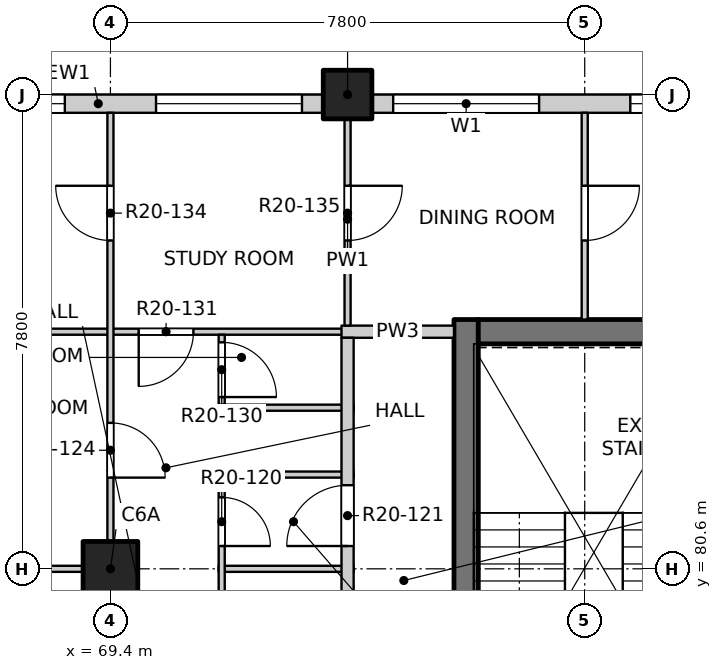
"""IFC4 building model, lengths in metres.
Left out: names, types, materials, properties, quantities, classifications, styles, units other than length and angle.
Written with IfcOpenShell. Run it as: python <this file> out.ifc"""

import sys

from ifc_helpers import new_model, si_unit, direction, frame, frame_2d, origin, origin_2d, place, context, subcontext, project, spatial, rectangle, extrude, element, fill, save


model = new_model("IFC4")
c1 = context("Model", 3, precision=1e-05, world=origin(), true_north=direction((0.0, 1.0)))
c2 = subcontext(c1, "Body", "Model", "MODEL_VIEW")
j1 = project(units=[si_unit("LENGTHUNIT", "METRE"), si_unit("PLANEANGLEUNIT", "RADIAN")], contexts=[c1])
p1 = place(None, origin())
s1 = spatial("IfcSite", under=j1, at=p1, CompositionType="ELEMENT")
p2 = place(p1, origin())
s2 = spatial("IfcBuilding", under=s1, at=p2, CompositionType="ELEMENT")
p3 = place(p2, frame((0.0, 0.0, 210.9)))
s3 = spatial("IfcBuildingStorey", under=s2, at=p3, CompositionType="ELEMENT", Elevation=210.9)
p4 = place(p3, frame((73.3, 88.4, -0.25), z_axis=(0.0, 0.0, 1.0), x_axis=(1.0, 0.0, 0.0)))
e1 = element("IfcColumn", 1, at=p4, inside=s3, PredefinedType="COLUMN", context=c2, shape_type="SweptSolid", body=[
    extrude(rectangle(XDim=0.8, YDim=0.8, at=origin_2d()), origin(), (0.0, 0.0, 1.0), 3.4),
])
p5 = place(p3, frame((69.4, 80.6, -0.25), z_axis=(0.0, 0.0, 1.0), x_axis=(1.0, 0.0, 0.0)))
e2 = element("IfcColumn", 2, at=p5, inside=s3, PredefinedType="COLUMN", context=c2, shape_type="SweptSolid", body=[
    extrude(rectangle(XDim=0.9, YDim=0.9, at=origin_2d()), origin(), (0.0, 0.0, 1.0), 3.4),
])
p6 = place(p3, frame((75.25, 77.3, -0.25), z_axis=(0.0, 0.0, 1.0), x_axis=(0.0, 1.0, 0.0)))
e3 = element("IfcWall", 3, at=p6, inside=s3, PredefinedType="SOLIDWALL", context=c2, shape_type="SweptSolid", body=[
    extrude(rectangle(XDim=7.4, YDim=0.4, at=frame_2d((3.7, 0.0))), origin(), (0.0, 0.0, 1.0), 3.4),
])
p7 = place(p6, frame((0.3, 0.0, 0.25)))
e4 = element("IfcOpeningElement", 4, at=p7, cuts=e3, PredefinedType="OPENING", context=c2, shape_type="SweptSolid", body=[
    extrude(rectangle(XDim=1.2, YDim=2.1, at=frame_2d((0.6, 1.05))), frame((0.0, 0.21, 0.0), z_axis=(0.0, -1.0, 0.0), x_axis=(1.0, 0.0, 0.0)), (0.0, 0.0, 1.0), 0.42),
])
p8 = place(p3, frame((75.45, 84.5, -0.25), z_axis=(0.0, 0.0, 1.0), x_axis=(1.0, 0.0, 0.0)))
e5 = element("IfcWall", 5, at=p8, inside=s3, PredefinedType="SOLIDWALL", context=c2, shape_type="SweptSolid", body=[
    extrude(rectangle(XDim=19.1, YDim=0.4, at=frame_2d((9.55, 0.0))), origin(), (0.0, 0.0, 1.0), 3.4),
])
p9 = place(p3, frame((65.5, 88.25, 0.0), z_axis=(0.0, 0.0, 1.0), x_axis=(1.0, 0.0, 0.0)))
e6 = element("IfcWall", 6, at=p9, inside=s3, PredefinedType="SOLIDWALL", context=c2, shape_type="SweptSolid", body=[
    extrude(rectangle(XDim=7.4, YDim=0.3, at=frame_2d((3.7, 0.0))), origin(), (0.0, 0.0, 1.0), 2.7),
])
p10 = place(p9, frame((0.75, 0.0, 0.9)))
e7 = element("IfcOpeningElement", 7, at=p10, cuts=e6, PredefinedType="OPENING", context=c2, shape_type="SweptSolid", body=[
    extrude(rectangle(XDim=2.4, YDim=1.8, at=frame_2d((1.2, 0.9))), frame((0.0, 0.16, 0.0), z_axis=(0.0, -1.0, 0.0), x_axis=(1.0, 0.0, 0.0)), (0.0, 0.0, 1.0), 0.32),
])
p11 = place(p9, frame((4.65, 0.0, 0.9)))
e8 = element("IfcOpeningElement", 8, at=p11, cuts=e6, PredefinedType="OPENING", context=c2, shape_type="SweptSolid", body=[
    extrude(rectangle(XDim=2.4, YDim=1.8, at=frame_2d((1.2, 0.9))), frame((0.0, 0.16, 0.0), z_axis=(0.0, -1.0, 0.0), x_axis=(1.0, 0.0, 0.0)), (0.0, 0.0, 1.0), 0.32),
])
p12 = place(p3, frame((73.7, 88.25, 0.0), z_axis=(0.0, 0.0, 1.0), x_axis=(1.0, 0.0, 0.0)))
e9 = element("IfcWall", 9, at=p12, inside=s3, PredefinedType="SOLIDWALL", context=c2, shape_type="SweptSolid", body=[
    extrude(rectangle(XDim=22.6, YDim=0.3, at=frame_2d((11.3, 0.0))), origin(), (0.0, 0.0, 1.0), 2.7),
])
p13 = place(p12, frame((0.35, 0.0, 0.9)))
e10 = element("IfcOpeningElement", 10, at=p13, cuts=e9, PredefinedType="OPENING", context=c2, shape_type="SweptSolid", body=[
    extrude(rectangle(XDim=2.4, YDim=1.8, at=frame_2d((1.2, 0.9))), frame((0.0, 0.16, 0.0), z_axis=(0.0, -1.0, 0.0), x_axis=(1.0, 0.0, 0.0)), (0.0, 0.0, 1.0), 0.32),
])
p14 = place(p12, frame((4.25, 0.0, 0.9)))
e11 = element("IfcOpeningElement", 11, at=p14, cuts=e9, PredefinedType="OPENING", context=c2, shape_type="SweptSolid", body=[
    extrude(rectangle(XDim=2.4, YDim=1.8, at=frame_2d((1.2, 0.9))), frame((0.0, 0.16, 0.0), z_axis=(0.0, -1.0, 0.0), x_axis=(1.0, 0.0, 0.0)), (0.0, 0.0, 1.0), 0.32),
])
p15 = place(p12, frame((8.15, 0.0, 0.9)))
e12 = element("IfcOpeningElement", 12, at=p15, cuts=e9, PredefinedType="OPENING", context=c2, shape_type="SweptSolid", body=[
    extrude(rectangle(XDim=2.4, YDim=1.8, at=frame_2d((1.2, 0.9))), frame((0.0, 0.16, 0.0), z_axis=(0.0, -1.0, 0.0), x_axis=(1.0, 0.0, 0.0)), (0.0, 0.0, 1.0), 0.32),
])
p16 = place(p12, frame((12.05, 0.0, 0.9)))
e13 = element("IfcOpeningElement", 13, at=p16, cuts=e9, PredefinedType="OPENING", context=c2, shape_type="SweptSolid", body=[
    extrude(rectangle(XDim=2.4, YDim=1.8, at=frame_2d((1.2, 0.9))), frame((0.0, 0.16, 0.0), z_axis=(0.0, -1.0, 0.0), x_axis=(1.0, 0.0, 0.0)), (0.0, 0.0, 1.0), 0.32),
])
p17 = place(p12, frame((15.95, 0.0, 0.9)))
e14 = element("IfcOpeningElement", 14, at=p17, cuts=e9, PredefinedType="OPENING", context=c2, shape_type="SweptSolid", body=[
    extrude(rectangle(XDim=2.4, YDim=1.8, at=frame_2d((1.2, 0.9))), frame((0.0, 0.16, 0.0), z_axis=(0.0, -1.0, 0.0), x_axis=(1.0, 0.0, 0.0)), (0.0, 0.0, 1.0), 0.32),
])
p18 = place(p12, frame((19.85, 0.0, 0.9)))
e15 = element("IfcOpeningElement", 15, at=p18, cuts=e9, PredefinedType="OPENING", context=c2, shape_type="SweptSolid", body=[
    extrude(rectangle(XDim=2.4, YDim=1.8, at=frame_2d((1.2, 0.9))), frame((0.0, 0.16, 0.0), z_axis=(0.0, -1.0, 0.0), x_axis=(1.0, 0.0, 0.0)), (0.0, 0.0, 1.0), 0.32),
])
p19 = place(p3, frame((61.9, 80.6, 0.0), z_axis=(0.0, 0.0, 1.0), x_axis=(1.0, 0.0, 0.0)))
e16 = element("IfcWall", 16, at=p19, inside=s3, PredefinedType="PARTITIONING", context=c2, shape_type="SweptSolid", body=[
    extrude(rectangle(XDim=7.55, YDim=0.1, at=frame_2d((3.775, 0.0))), origin(), (0.0, 0.0, 1.0), 3.15),
])
for number, where, z_axis, x_axis in (
    (17, (71.18, 80.6, 0.0), (0.0, 0.0, 1.0), (1.0, 0.0, 0.0)),
    (18, (71.18, 82.15, 0.0), (0.0, 0.0, 1.0), (1.0, 0.0, 0.0)),
    (19, (71.18, 83.25, 0.0), (0.0, 0.0, 1.0), (1.0, 0.0, 0.0)),
):
    element("IfcWall", number, at=place(p3, frame(where, z_axis=z_axis, x_axis=x_axis)), inside=s3, PredefinedType="PARTITIONING", context=c2, shape_type="SweptSolid", body=[
        extrude(rectangle(XDim=2.22, YDim=0.1, at=frame_2d((1.11, 0.0))), origin(), (0.0, 0.0, 1.0), 3.15),
    ])
p20 = place(p3, frame((61.9, 84.5, 0.0), z_axis=(0.0, 0.0, 1.0), x_axis=(1.0, 0.0, 0.0)))
e20 = element("IfcWall", 20, at=p20, inside=s3, PredefinedType="PARTITIONING", context=c2, shape_type="SweptSolid", body=[
    extrude(rectangle(XDim=11.5, YDim=0.1, at=frame_2d((5.75, 0.0))), origin(), (0.0, 0.0, 1.0), 3.15),
])
p21 = place(p20, frame((7.965, 0.0, 0.0)))
e21 = element("IfcOpeningElement", 21, at=p21, cuts=e20, PredefinedType="OPENING", context=c2, shape_type="SweptSolid", body=[
    extrude(rectangle(XDim=0.9, YDim=2.1, at=frame_2d((0.45, 1.05))), frame((0.0, 0.06, 0.0), z_axis=(0.0, -1.0, 0.0), x_axis=(1.0, 0.0, 0.0)), (0.0, 0.0, 1.0), 0.12),
])
p22 = place(p3, frame((73.2, 84.5, 0.0), z_axis=(0.0, 0.0, 1.0), x_axis=(1.0, 0.0, 0.0)))
e22 = element("IfcWall", 22, at=p22, inside=s3, PredefinedType="PARTITIONING", context=c2, shape_type="SweptSolid", body=[
    extrude(rectangle(XDim=1.85, YDim=0.2, at=frame_2d((0.925, 0.0))), origin(), (0.0, 0.0, 1.0), 3.15),
])
p23 = place(p3, frame((69.4, 41.9, 0.0), z_axis=(0.0, 0.0, 1.0), x_axis=(0.0, 1.0, 0.0)))
e23 = element("IfcWall", 23, at=p23, inside=s3, PredefinedType="PARTITIONING", context=c2, shape_type="SweptSolid", body=[
    extrude(rectangle(XDim=46.2, YDim=0.1, at=frame_2d((23.1, 0.0))), origin(), (0.0, 0.0, 1.0), 3.15),
])
p24 = place(p23, frame((1.2, 0.0, 0.0)))
e24 = element("IfcOpeningElement", 24, at=p24, cuts=e23, PredefinedType="OPENING", context=c2, shape_type="SweptSolid", body=[
    extrude(rectangle(XDim=0.9, YDim=2.1, at=frame_2d((0.45, 1.05))), frame((0.0, 0.06, 0.0), z_axis=(0.0, -1.0, 0.0), x_axis=(1.0, 0.0, 0.0)), (0.0, 0.0, 1.0), 0.12),
])
p25 = place(p23, frame((5.1, 0.0, 0.0)))
e25 = element("IfcOpeningElement", 25, at=p25, cuts=e23, PredefinedType="OPENING", context=c2, shape_type="SweptSolid", body=[
    extrude(rectangle(XDim=0.9, YDim=2.1, at=frame_2d((0.45, 1.05))), frame((0.0, 0.06, 0.0), z_axis=(0.0, -1.0, 0.0), x_axis=(1.0, 0.0, 0.0)), (0.0, 0.0, 1.0), 0.12),
])
p26 = place(p23, frame((9.975, 0.0, 0.0)))
e26 = element("IfcOpeningElement", 26, at=p26, cuts=e23, PredefinedType="OPENING", context=c2, shape_type="SweptSolid", body=[
    extrude(rectangle(XDim=0.9, YDim=2.1, at=frame_2d((0.45, 1.05))), frame((0.0, 0.06, 0.0), z_axis=(0.0, -1.0, 0.0), x_axis=(1.0, 0.0, 0.0)), (0.0, 0.0, 1.0), 0.12),
])
p27 = place(p23, frame((12.9, 0.0, 0.0)))
e27 = element("IfcOpeningElement", 27, at=p27, cuts=e23, PredefinedType="OPENING", context=c2, shape_type="SweptSolid", body=[
    extrude(rectangle(XDim=0.9, YDim=2.1, at=frame_2d((0.45, 1.05))), frame((0.0, 0.06, 0.0), z_axis=(0.0, -1.0, 0.0), x_axis=(1.0, 0.0, 0.0)), (0.0, 0.0, 1.0), 0.12),
])
p28 = place(p23, frame((17.775, 0.0, 0.0)))
e28 = element("IfcOpeningElement", 28, at=p28, cuts=e23, PredefinedType="OPENING", context=c2, shape_type="SweptSolid", body=[
    extrude(rectangle(XDim=0.9, YDim=2.1, at=frame_2d((0.45, 1.05))), frame((0.0, 0.06, 0.0), z_axis=(0.0, -1.0, 0.0), x_axis=(1.0, 0.0, 0.0)), (0.0, 0.0, 1.0), 0.12),
])
p29 = place(p23, frame((21.625, 0.0, 0.0)))
e29 = element("IfcOpeningElement", 29, at=p29, cuts=e23, PredefinedType="OPENING", context=c2, shape_type="SweptSolid", body=[
    extrude(rectangle(XDim=0.9, YDim=2.1, at=frame_2d((0.45, 1.05))), frame((0.0, 0.06, 0.0), z_axis=(0.0, -1.0, 0.0), x_axis=(1.0, 0.0, 0.0)), (0.0, 0.0, 1.0), 0.12),
])
p30 = place(p23, frame((24.6, 0.0, 0.0)))
e30 = element("IfcOpeningElement", 30, at=p30, cuts=e23, PredefinedType="OPENING", context=c2, shape_type="SweptSolid", body=[
    extrude(rectangle(XDim=0.9, YDim=2.1, at=frame_2d((0.45, 1.05))), frame((0.0, 0.06, 0.0), z_axis=(0.0, -1.0, 0.0), x_axis=(1.0, 0.0, 0.0)), (0.0, 0.0, 1.0), 0.12),
])
p31 = place(p23, frame((28.5, 0.0, 0.0)))
e31 = element("IfcOpeningElement", 31, at=p31, cuts=e23, PredefinedType="OPENING", context=c2, shape_type="SweptSolid", body=[
    extrude(rectangle(XDim=0.9, YDim=2.1, at=frame_2d((0.45, 1.05))), frame((0.0, 0.06, 0.0), z_axis=(0.0, -1.0, 0.0), x_axis=(1.0, 0.0, 0.0)), (0.0, 0.0, 1.0), 0.12),
])
p32 = place(p23, frame((33.375, 0.0, 0.0)))
e32 = element("IfcOpeningElement", 32, at=p32, cuts=e23, PredefinedType="OPENING", context=c2, shape_type="SweptSolid", body=[
    extrude(rectangle(XDim=0.9, YDim=2.1, at=frame_2d((0.45, 1.05))), frame((0.0, 0.06, 0.0), z_axis=(0.0, -1.0, 0.0), x_axis=(1.0, 0.0, 0.0)), (0.0, 0.0, 1.0), 0.12),
])
p33 = place(p23, frame((37.225, 0.0, 0.0)))
e33 = element("IfcOpeningElement", 33, at=p33, cuts=e23, PredefinedType="OPENING", context=c2, shape_type="SweptSolid", body=[
    extrude(rectangle(XDim=0.9, YDim=2.1, at=frame_2d((0.45, 1.05))), frame((0.0, 0.06, 0.0), z_axis=(0.0, -1.0, 0.0), x_axis=(1.0, 0.0, 0.0)), (0.0, 0.0, 1.0), 0.12),
])
p34 = place(p23, frame((40.2, 0.0, 0.0)))
e34 = element("IfcOpeningElement", 34, at=p34, cuts=e23, PredefinedType="OPENING", context=c2, shape_type="SweptSolid", body=[
    extrude(rectangle(XDim=0.9, YDim=2.1, at=frame_2d((0.45, 1.05))), frame((0.0, 0.06, 0.0), z_axis=(0.0, -1.0, 0.0), x_axis=(1.0, 0.0, 0.0)), (0.0, 0.0, 1.0), 0.12),
])
p35 = place(p23, frame((44.1, 0.0, 0.0)))
e35 = element("IfcOpeningElement", 35, at=p35, cuts=e23, PredefinedType="OPENING", context=c2, shape_type="SweptSolid", body=[
    extrude(rectangle(XDim=0.9, YDim=2.1, at=frame_2d((0.45, 1.05))), frame((0.0, 0.06, 0.0), z_axis=(0.0, -1.0, 0.0), x_axis=(1.0, 0.0, 0.0)), (0.0, 0.0, 1.0), 0.12),
])
p36 = place(p3, frame((71.23, 74.5, 0.0), z_axis=(0.0, 0.0, 1.0), x_axis=(0.0, 1.0, 0.0)))
e36 = element("IfcWall", 36, at=p36, inside=s3, PredefinedType="PARTITIONING", context=c2, shape_type="SweptSolid", body=[
    extrude(rectangle(XDim=7.6, YDim=0.1, at=frame_2d((3.8, 0.0))), origin(), (0.0, 0.0, 1.0), 3.15),
])
p37 = place(p36, frame((0.625, 0.0, 0.0)))
e37 = element("IfcOpeningElement", 37, at=p37, cuts=e36, PredefinedType="OPENING", context=c2, shape_type="SweptSolid", body=[
    extrude(rectangle(XDim=0.9, YDim=2.1, at=frame_2d((0.45, 1.05))), frame((0.0, 0.06, 0.0), z_axis=(0.0, -1.0, 0.0), x_axis=(1.0, 0.0, 0.0)), (0.0, 0.0, 1.0), 0.12),
])
p38 = place(p36, frame((2.835, 0.0, 0.0)))
e38 = element("IfcOpeningElement", 38, at=p38, cuts=e36, PredefinedType="OPENING", context=c2, shape_type="SweptSolid", body=[
    extrude(rectangle(XDim=0.9, YDim=2.1, at=frame_2d((0.45, 1.05))), frame((0.0, 0.06, 0.0), z_axis=(0.0, -1.0, 0.0), x_axis=(1.0, 0.0, 0.0)), (0.0, 0.0, 1.0), 0.12),
])
p39 = place(p36, frame((4.785, 0.0, 0.0)))
e39 = element("IfcOpeningElement", 39, at=p39, cuts=e36, PredefinedType="OPENING", context=c2, shape_type="SweptSolid", body=[
    extrude(rectangle(XDim=0.9, YDim=2.1, at=frame_2d((0.45, 1.05))), frame((0.0, 0.06, 0.0), z_axis=(0.0, -1.0, 0.0), x_axis=(1.0, 0.0, 0.0)), (0.0, 0.0, 1.0), 0.12),
])
p40 = place(p36, frame((6.475, 0.0, 0.0)))
e40 = element("IfcOpeningElement", 40, at=p40, cuts=e36, PredefinedType="OPENING", context=c2, shape_type="SweptSolid", body=[
    extrude(rectangle(XDim=0.8, YDim=2.1, at=frame_2d((0.4, 1.05))), frame((0.0, 0.06, 0.0), z_axis=(0.0, -1.0, 0.0), x_axis=(1.0, 0.0, 0.0)), (0.0, 0.0, 1.0), 0.12),
])
p41 = place(p3, frame((71.23, 83.3, 0.0), z_axis=(0.0, 0.0, 1.0), x_axis=(0.0, 1.0, 0.0)))
e41 = element("IfcWall", 41, at=p41, inside=s3, PredefinedType="PARTITIONING", context=c2, shape_type="SweptSolid", body=[
    extrude(rectangle(XDim=1.15, YDim=0.1, at=frame_2d((0.575, 0.0))), origin(), (0.0, 0.0, 1.0), 3.15),
])
p42 = place(p41, frame((0.125, 0.0, 0.0)))
e42 = element("IfcOpeningElement", 42, at=p42, cuts=e41, PredefinedType="OPENING", context=c2, shape_type="SweptSolid", body=[
    extrude(rectangle(XDim=0.9, YDim=2.1, at=frame_2d((0.45, 1.05))), frame((0.0, 0.06, 0.0), z_axis=(0.0, -1.0, 0.0), x_axis=(1.0, 0.0, 0.0)), (0.0, 0.0, 1.0), 0.12),
])
p43 = place(p3, frame((73.3, 49.5, 0.0), z_axis=(0.0, 0.0, 1.0), x_axis=(0.0, 1.0, 0.0)))
e43 = element("IfcWall", 43, at=p43, inside=s3, PredefinedType="PARTITIONING", context=c2, shape_type="SweptSolid", body=[
    extrude(rectangle(XDim=34.9, YDim=0.2, at=frame_2d((17.45, 0.0))), origin(), (0.0, 0.0, 1.0), 3.15),
])
p44 = place(p43, frame((3.225, 0.0, 0.0)))
e44 = element("IfcOpeningElement", 44, at=p44, cuts=e43, PredefinedType="OPENING", context=c2, shape_type="SweptSolid", body=[
    extrude(rectangle(XDim=1.0, YDim=2.1, at=frame_2d((0.5, 1.05))), frame((0.0, 0.11, 0.0), z_axis=(0.0, -1.0, 0.0), x_axis=(1.0, 0.0, 0.0)), (0.0, 0.0, 1.0), 0.22),
])
p45 = place(p43, frame((25.125, 0.0, 0.0)))
e45 = element("IfcOpeningElement", 45, at=p45, cuts=e43, PredefinedType="OPENING", context=c2, shape_type="SweptSolid", body=[
    extrude(rectangle(XDim=1.0, YDim=2.1, at=frame_2d((0.5, 1.05))), frame((0.0, 0.11, 0.0), z_axis=(0.0, -1.0, 0.0), x_axis=(1.0, 0.0, 0.0)), (0.0, 0.0, 1.0), 0.22),
])
p46 = place(p43, frame((31.475, 0.0, 0.0)))
e46 = element("IfcOpeningElement", 46, at=p46, cuts=e43, PredefinedType="OPENING", context=c2, shape_type="SweptSolid", body=[
    extrude(rectangle(XDim=1.0, YDim=2.1, at=frame_2d((0.5, 1.05))), frame((0.0, 0.11, 0.0), z_axis=(0.0, -1.0, 0.0), x_axis=(1.0, 0.0, 0.0)), (0.0, 0.0, 1.0), 0.22),
])
p47 = place(p3, frame((73.3, 84.6, 0.0), z_axis=(0.0, 0.0, 1.0), x_axis=(0.0, 1.0, 0.0)))
e47 = element("IfcWall", 47, at=p47, inside=s3, PredefinedType="PARTITIONING", context=c2, shape_type="SweptSolid", body=[
    extrude(rectangle(XDim=3.5, YDim=0.1, at=frame_2d((1.75, 0.0))), origin(), (0.0, 0.0, 1.0), 3.15),
])
p48 = place(p47, frame((1.4, 0.0, 0.0)))
e48 = element("IfcOpeningElement", 48, at=p48, cuts=e47, PredefinedType="OPENING", context=c2, shape_type="SweptSolid", body=[
    extrude(rectangle(XDim=0.9, YDim=2.1, at=frame_2d((0.45, 1.05))), frame((0.0, 0.06, 0.0), z_axis=(0.0, -1.0, 0.0), x_axis=(1.0, 0.0, 0.0)), (0.0, 0.0, 1.0), 0.12),
])
p49 = place(p3, frame((77.2, 84.7, 0.0), z_axis=(0.0, 0.0, 1.0), x_axis=(0.0, 1.0, 0.0)))
e49 = element("IfcWall", 49, at=p49, inside=s3, PredefinedType="PARTITIONING", context=c2, shape_type="SweptSolid", body=[
    extrude(rectangle(XDim=3.4, YDim=0.1, at=frame_2d((1.7, 0.0))), origin(), (0.0, 0.0, 1.0), 3.15),
])
p50 = place(p49, frame((1.3, 0.0, 0.0)))
e50 = element("IfcOpeningElement", 50, at=p50, cuts=e49, PredefinedType="OPENING", context=c2, shape_type="SweptSolid", body=[
    extrude(rectangle(XDim=0.9, YDim=2.1, at=frame_2d((0.45, 1.05))), frame((0.0, 0.06, 0.0), z_axis=(0.0, -1.0, 0.0), x_axis=(1.0, 0.0, 0.0)), (0.0, 0.0, 1.0), 0.12),
])
p51 = place(p10, origin())
e51 = element("IfcWindow", 51, at=p51, inside=s3, PartitioningType="DOUBLE_PANEL_VERTICAL", PredefinedType="WINDOW", context=c2, shape_type="SweptSolid", body=[
    extrude(rectangle(XDim=2.4, YDim=1.8, at=frame_2d((1.2, 0.9))), frame((0.0, 0.03, 0.0), z_axis=(0.0, -1.0, 0.0), x_axis=(1.0, 0.0, 0.0)), (0.0, 0.0, 1.0), 0.06),
])
fill(e7, e51)
p52 = place(p11, origin())
e52 = element("IfcWindow", 52, at=p52, inside=s3, PartitioningType="DOUBLE_PANEL_VERTICAL", PredefinedType="WINDOW", context=c2, shape_type="SweptSolid", body=[
    extrude(rectangle(XDim=2.4, YDim=1.8, at=frame_2d((1.2, 0.9))), frame((0.0, 0.03, 0.0), z_axis=(0.0, -1.0, 0.0), x_axis=(1.0, 0.0, 0.0)), (0.0, 0.0, 1.0), 0.06),
])
fill(e8, e52)
p53 = place(p13, origin())
e53 = element("IfcWindow", 53, at=p53, inside=s3, PartitioningType="DOUBLE_PANEL_VERTICAL", PredefinedType="WINDOW", context=c2, shape_type="SweptSolid", body=[
    extrude(rectangle(XDim=2.4, YDim=1.8, at=frame_2d((1.2, 0.9))), frame((0.0, 0.03, 0.0), z_axis=(0.0, -1.0, 0.0), x_axis=(1.0, 0.0, 0.0)), (0.0, 0.0, 1.0), 0.06),
])
fill(e10, e53)
p54 = place(p14, origin())
e54 = element("IfcWindow", 54, at=p54, inside=s3, PartitioningType="DOUBLE_PANEL_VERTICAL", PredefinedType="WINDOW", context=c2, shape_type="SweptSolid", body=[
    extrude(rectangle(XDim=2.4, YDim=1.8, at=frame_2d((1.2, 0.9))), frame((0.0, 0.03, 0.0), z_axis=(0.0, -1.0, 0.0), x_axis=(1.0, 0.0, 0.0)), (0.0, 0.0, 1.0), 0.06),
])
fill(e11, e54)
p55 = place(p40, origin())
e55 = element("IfcDoor", 55, at=p55, inside=s3, OperationType="SINGLE_SWING_RIGHT", PredefinedType="DOOR", context=c2, shape_type="SweptSolid", body=[
    extrude(rectangle(XDim=0.8, YDim=2.1, at=frame_2d((0.4, 1.05))), frame((0.0, 0.025, 0.0), z_axis=(0.0, -1.0, 0.0), x_axis=(1.0, 0.0, 0.0)), (0.0, 0.0, 1.0), 0.05),
])
fill(e40, e55)
p56 = place(p46, origin())
e56 = element("IfcDoor", 56, at=p56, inside=s3, OperationType="SINGLE_SWING_LEFT", PredefinedType="DOOR", context=c2, shape_type="SweptSolid", body=[
    extrude(rectangle(XDim=1.0, YDim=2.1, at=frame_2d((0.5, 1.05))), frame((0.0, 0.025, 0.0), z_axis=(0.0, -1.0, 0.0), x_axis=(1.0, 0.0, 0.0)), (0.0, 0.0, 1.0), 0.05),
])
fill(e46, e56)
p57 = place(p34, origin())
e57 = element("IfcDoor", 57, at=p57, inside=s3, OperationType="SINGLE_SWING_RIGHT", PredefinedType="DOOR", context=c2, shape_type="SweptSolid", body=[
    extrude(rectangle(XDim=0.9, YDim=2.1, at=frame_2d((0.45, 1.05))), frame((0.0, 0.025, 0.0), z_axis=(0.0, -1.0, 0.0), x_axis=(1.0, 0.0, 0.0)), (0.0, 0.0, 1.0), 0.05),
])
fill(e34, e57)
p58 = place(p42, origin())
e58 = element("IfcDoor", 58, at=p58, inside=s3, OperationType="SINGLE_SWING_RIGHT", PredefinedType="DOOR", context=c2, shape_type="SweptSolid", body=[
    extrude(rectangle(XDim=0.9, YDim=2.1, at=frame_2d((0.45, 1.05))), frame((0.0, 0.025, 0.0), z_axis=(0.0, -1.0, 0.0), x_axis=(1.0, 0.0, 0.0)), (0.0, 0.0, 1.0), 0.05),
])
fill(e42, e58)
p59 = place(p21, origin())
e59 = element("IfcDoor", 59, at=p59, inside=s3, OperationType="SINGLE_SWING_RIGHT", PredefinedType="DOOR", context=c2, shape_type="SweptSolid", body=[
    extrude(rectangle(XDim=0.9, YDim=2.1, at=frame_2d((0.45, 1.05))), frame((0.0, 0.025, 0.0), z_axis=(0.0, -1.0, 0.0), x_axis=(1.0, 0.0, 0.0)), (0.0, 0.0, 1.0), 0.05),
])
fill(e21, e59)
p60 = place(p35, origin())
e60 = element("IfcDoor", 60, at=p60, inside=s3, OperationType="SINGLE_SWING_RIGHT", PredefinedType="DOOR", context=c2, shape_type="SweptSolid", body=[
    extrude(rectangle(XDim=0.9, YDim=2.1, at=frame_2d((0.45, 1.05))), frame((0.0, 0.025, 0.0), z_axis=(0.0, -1.0, 0.0), x_axis=(1.0, 0.0, 0.0)), (0.0, 0.0, 1.0), 0.05),
])
fill(e35, e60)
p61 = place(p48, origin())
e61 = element("IfcDoor", 61, at=p61, inside=s3, OperationType="SINGLE_SWING_LEFT", PredefinedType="DOOR", context=c2, shape_type="SweptSolid", body=[
    extrude(rectangle(XDim=0.9, YDim=2.1, at=frame_2d((0.45, 1.05))), frame((0.0, 0.025, 0.0), z_axis=(0.0, -1.0, 0.0), x_axis=(1.0, 0.0, 0.0)), (0.0, 0.0, 1.0), 0.05),
])
fill(e48, e61)
p62 = place(p50, origin())
e62 = element("IfcDoor", 62, at=p62, inside=s3, OperationType="SINGLE_SWING_LEFT", PredefinedType="DOOR", context=c2, shape_type="SweptSolid", body=[
    extrude(rectangle(XDim=0.9, YDim=2.1, at=frame_2d((0.45, 1.05))), frame((0.0, 0.025, 0.0), z_axis=(0.0, -1.0, 0.0), x_axis=(1.0, 0.0, 0.0)), (0.0, 0.0, 1.0), 0.05),
])
fill(e50, e62)
save(model, sys.argv[1])
